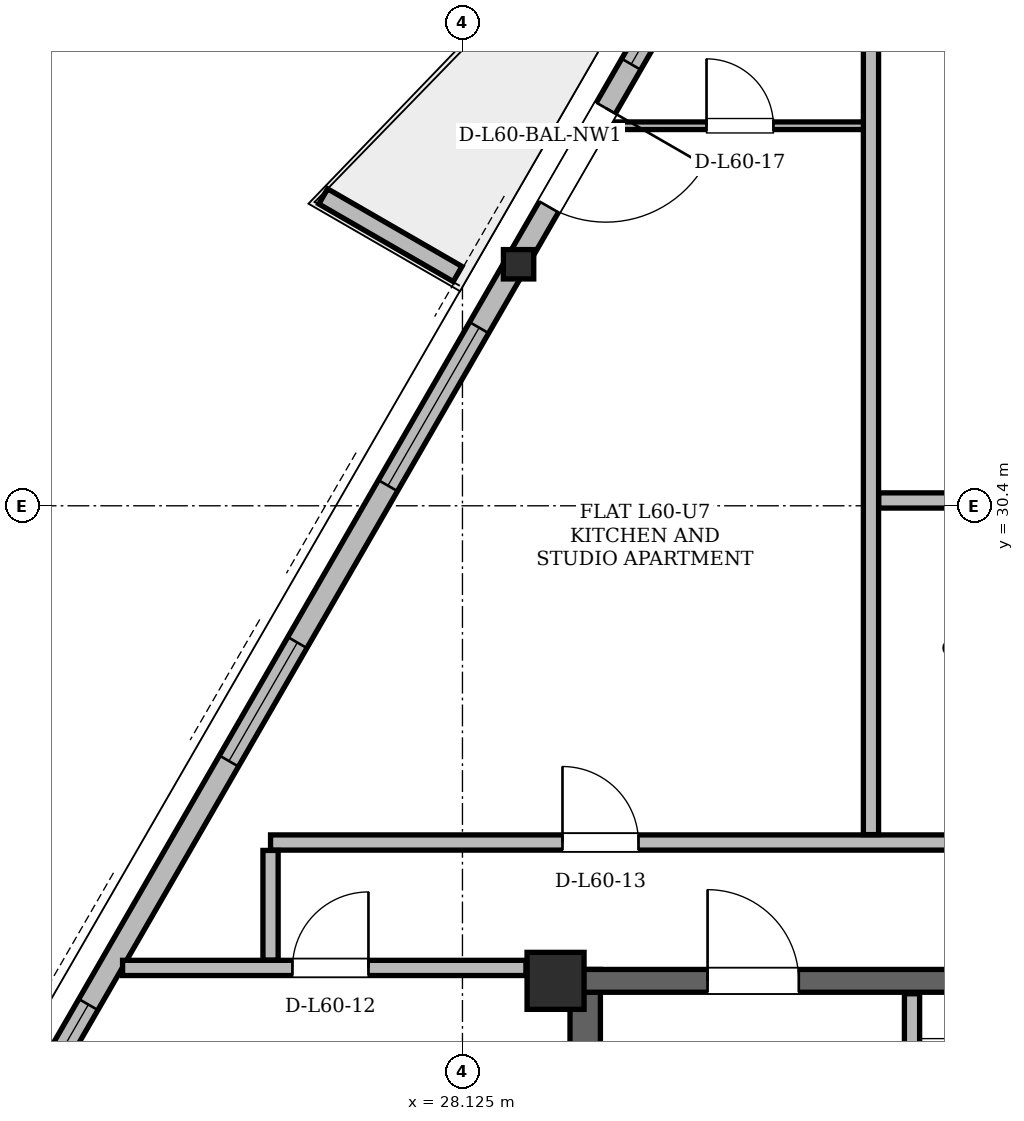
"""IFC4 building model, lengths in metres.
Left out: names, types, materials, properties, quantities, classifications, styles, units other than length and angle.
Written with IfcOpenShell. Run it as: python <this file> out.ifc"""

import sys

from ifc_helpers import new_model, si_unit, direction, frame, frame_2d, origin, origin_2d, place, context, subcontext, project, spatial, polyline, rectangle, hollow_rectangle, i_section, outline, extrude, element, fill, save


model = new_model("IFC4")
c1 = context("Model", 3, precision=1e-05, world=origin(), true_north=direction((0.0, 1.0)))
c2 = subcontext(c1, "Body", "Model", "MODEL_VIEW")
j1 = project(units=[si_unit("LENGTHUNIT", "METRE"), si_unit("PLANEANGLEUNIT", "RADIAN")], contexts=[c1])
p1 = place(None, origin())
s1 = spatial("IfcSite", under=j1, at=p1, CompositionType="ELEMENT")
p2 = place(p1, origin())
s2 = spatial("IfcBuilding", under=s1, at=p2, CompositionType="ELEMENT")
p3 = place(p2, frame((0.0, 0.0, 227.1)))
s3 = spatial("IfcBuildingStorey", under=s2, at=p3, CompositionType="ELEMENT", Elevation=227.1)
p4 = place(p3, frame((29.35, 24.15, 0.0), z_axis=(0.0, 0.0, 1.0), x_axis=(1.0, 0.0, 0.0)))
e1 = element("IfcColumn", 1, at=p4, inside=s3, PredefinedType="COLUMN", context=c2, shape_type="SweptSolid", body=[
    extrude(hollow_rectangle(XDim=0.75, YDim=0.75, WallThickness=0.06, at=origin_2d()), origin(), (0.0, 0.0, 1.0), 3.6),
])
p5 = place(p3, frame((28.833, 33.589, 0.004), z_axis=(0.017129504481, -0.006389577068, 0.999832862723), x_axis=(0.349493096334, 0.936938939107, 0.0)))
e2 = element("IfcColumn", 2, at=p5, inside=s3, PredefinedType="COLUMN", context=c2, shape_type="SweptSolid", body=[
    extrude(i_section(OverallWidth=0.399, OverallDepth=0.386, WebThickness=0.021, FlangeThickness=0.033, at=origin_2d()), origin(), (0.0, 0.0, 1.0), 3.592),
])
p6 = place(p3, frame((29.74, 11.0, 0.0), z_axis=(0.0, 0.0, 1.0), x_axis=(0.0, 1.0, 0.0)))
e3 = element("IfcWall", 3, at=p6, inside=s3, PredefinedType="SHEAR", context=c2, shape_type="SweptSolid", body=[
    extrude(rectangle(XDim=13.3, YDim=0.4, at=frame_2d((6.65, 0.0))), origin(), (0.0, 0.0, 1.0), 3.38),
])
p7 = place(p3, frame((29.65, 24.15, 0.0), z_axis=(0.0, 0.0, 1.0), x_axis=(1.0, 0.0, 0.0)))
e4 = element("IfcWall", 4, at=p7, inside=s3, PredefinedType="SHEAR", context=c2, shape_type="SweptSolid", body=[
    extrude(rectangle(XDim=15.7, YDim=0.3, at=frame_2d((7.85, 0.0))), origin(), (0.0, 0.0, 1.0), 3.38),
])
p8 = place(p7, frame((1.7, 0.0, 0.0)))
e5 = element("IfcOpeningElement", 5, at=p8, cuts=e4, PredefinedType="OPENING", context=c2, shape_type="SweptSolid", body=[
    extrude(rectangle(XDim=1.2, YDim=2.2, at=frame_2d((0.6, 1.1))), frame((0.0, 0.15, 0.0), z_axis=(0.0, -1.0, 0.0), x_axis=(1.0, 0.0, 0.0)), (0.0, 0.0, 1.0), 0.3),
])
p9 = place(p7, frame((12.8, 0.0, 0.0)))
e6 = element("IfcOpeningElement", 6, at=p9, cuts=e4, PredefinedType="OPENING", context=c2, shape_type="SweptSolid", body=[
    extrude(rectangle(XDim=1.2, YDim=2.2, at=frame_2d((0.6, 1.1))), frame((0.0, 0.15, 0.0), z_axis=(0.0, -1.0, 0.0), x_axis=(1.0, 0.0, 0.0)), (0.0, 0.0, 1.0), 0.3),
])
p10 = place(p7, frame((6.55, 0.0, 0.0)))
e7 = element("IfcOpeningElement", 7, at=p10, cuts=e4, PredefinedType="OPENING", context=c2, shape_type="SweptSolid", body=[
    extrude(rectangle(XDim=0.9, YDim=2.05, at=frame_2d((0.45, 1.025))), frame((0.0, 0.15, 0.0), z_axis=(0.0, -1.0, 0.0), x_axis=(1.0, 0.0, 0.0)), (0.0, 0.0, 1.0), 0.3),
])
p11 = place(p7, frame((8.45, 0.0, 0.0)))
e8 = element("IfcOpeningElement", 8, at=p11, cuts=e4, PredefinedType="OPENING", context=c2, shape_type="SweptSolid", body=[
    extrude(rectangle(XDim=0.9, YDim=2.05, at=frame_2d((0.45, 1.025))), frame((0.0, 0.15, 0.0), z_axis=(0.0, -1.0, 0.0), x_axis=(1.0, 0.0, 0.0)), (0.0, 0.0, 1.0), 0.3),
])
p12 = place(p3, frame((34.344, 43.135, 0.0), z_axis=(0.0, 0.0, 1.0), x_axis=(-0.499998927115, -0.866026023214, 0.0)))
e9 = element("IfcWall", 9, at=p12, inside=s3, PredefinedType="SOLIDWALL", context=c2, shape_type="SweptSolid", body=[
    extrude(rectangle(XDim=36.742, YDim=0.29, at=frame_2d((18.371, 0.0))), origin(), (0.0, 0.0, 1.0), 2.677),
])
p13 = place(p12, frame((8.664, 0.0, 0.0)))
e10 = element("IfcOpeningElement", 10, at=p13, cuts=e9, PredefinedType="OPENING", context=c2, shape_type="SweptSolid", body=[
    extrude(rectangle(XDim=1.5, YDim=2.2, at=frame_2d((0.75, 1.1))), frame((0.0, 0.145, 0.0), z_axis=(0.0, -1.0, 0.0), x_axis=(1.0, 0.0, 0.0)), (0.0, 0.0, 1.0), 0.29),
])
p14 = place(p12, frame((28.452, 0.0, 0.0)))
e11 = element("IfcOpeningElement", 11, at=p14, cuts=e9, PredefinedType="OPENING", context=c2, shape_type="SweptSolid", body=[
    extrude(rectangle(XDim=1.5, YDim=2.2, at=frame_2d((0.75, 1.1))), frame((0.0, 0.145, 0.0), z_axis=(0.0, -1.0, 0.0), x_axis=(1.0, 0.0, 0.0)), (0.0, 0.0, 1.0), 0.29),
])
p15 = place(p12, frame((22.282, 0.0, 0.85)))
e12 = element("IfcOpeningElement", 12, at=p15, cuts=e9, PredefinedType="OPENING", context=c2, shape_type="SweptSolid", body=[
    extrude(rectangle(XDim=2.4, YDim=1.717, at=frame_2d((1.2, 0.858))), frame((0.0, 0.145, 0.0), z_axis=(0.0, -1.0, 0.0), x_axis=(1.0, 0.0, 0.0)), (0.0, 0.0, 1.0), 0.29),
])
p16 = place(p12, frame((33.369, 0.0, 0.85)))
e13 = element("IfcOpeningElement", 13, at=p16, cuts=e9, PredefinedType="OPENING", context=c2, shape_type="SweptSolid", body=[
    extrude(rectangle(XDim=2.2, YDim=1.717, at=frame_2d((1.1, 0.858))), frame((0.0, 0.145, 0.0), z_axis=(0.0, -1.0, 0.0), x_axis=(1.0, 0.0, 0.0)), (0.0, 0.0, 1.0), 0.29),
])
p17 = place(p12, frame((11.999, 0.0, 0.85)))
e14 = element("IfcOpeningElement", 14, at=p17, cuts=e9, PredefinedType="OPENING", context=c2, shape_type="SweptSolid", body=[
    extrude(rectangle(XDim=2.4, YDim=1.717, at=frame_2d((1.2, 0.858))), frame((0.0, 0.145, 0.0), z_axis=(0.0, -1.0, 0.0), x_axis=(1.0, 0.0, 0.0)), (0.0, 0.0, 1.0), 0.29),
])
p18 = place(p12, frame((16.783, 0.0, 0.85)))
e15 = element("IfcOpeningElement", 15, at=p18, cuts=e9, PredefinedType="OPENING", context=c2, shape_type="SweptSolid", body=[
    extrude(rectangle(XDim=1.8, YDim=1.717, at=frame_2d((0.9, 0.858))), frame((0.0, 0.145, 0.0), z_axis=(0.0, -1.0, 0.0), x_axis=(1.0, 0.0, 0.0)), (0.0, 0.0, 1.0), 0.29),
])
p19 = place(p12, frame((3.365, 0.0, 0.85)))
e16 = element("IfcOpeningElement", 16, at=p19, cuts=e9, PredefinedType="OPENING", context=c2, shape_type="SweptSolid", body=[
    extrude(rectangle(XDim=1.2, YDim=1.48, at=frame_2d((0.6, 0.74))), frame((0.0, 0.145, 0.0), z_axis=(0.0, -1.0, 0.0), x_axis=(1.0, 0.0, 0.0)), (0.0, 0.0, 1.0), 0.29),
])
p20 = place(p12, frame((6.797, 0.0, 0.85)))
e17 = element("IfcOpeningElement", 17, at=p20, cuts=e9, PredefinedType="OPENING", context=c2, shape_type="SweptSolid", body=[
    extrude(rectangle(XDim=1.2, YDim=1.48, at=frame_2d((0.6, 0.74))), frame((0.0, 0.145, 0.0), z_axis=(0.0, -1.0, 0.0), x_axis=(1.0, 0.0, 0.0)), (0.0, 0.0, 1.0), 0.29),
])
p21 = place(p3, frame((28.061, 33.449, 0.0), z_axis=(0.0, 0.0, 1.0), x_axis=(-0.866012356593, 0.500022597718, 0.0)))
e18 = element("IfcWall", 18, at=p21, inside=s3, PredefinedType="PARAPET", context=c2, shape_type="SweptSolid", body=[
    extrude(outline(polyline([(0.0, 0.0), (2.042, 0.0), (2.042, 1.1), (0.0, 1.32), (0.0, 0.0)])), frame((0.0, 0.115, 0.0), z_axis=(0.0, -1.0, 0.0), x_axis=(1.0, 0.0, 0.0)), (0.0, 0.0, 1.0), 0.23),
])
p22 = place(p3, frame((34.04, 19.48, 0.0), z_axis=(0.0, 0.0, 1.0), x_axis=(0.0, 1.0, 0.0)))
e19 = element("IfcWall", 19, at=p22, inside=s3, PredefinedType="PARTITIONING", context=c2, shape_type="SweptSolid", body=[
    extrude(rectangle(XDim=4.5, YDim=0.2, at=frame_2d((2.25, 0.0))), origin(), (0.0, 0.0, 1.0), 3.38),
])
p23 = place(p22, frame((2.12, 0.0, 0.0)))
e20 = element("IfcOpeningElement", 20, at=p23, cuts=e19, PredefinedType="OPENING", context=c2, shape_type="SweptSolid", body=[
    extrude(rectangle(XDim=1.1, YDim=2.2, at=frame_2d((0.55, 1.1))), frame((0.0, 0.1, 0.0), z_axis=(0.0, -1.0, 0.0), x_axis=(1.0, 0.0, 0.0)), (0.0, 0.0, 1.0), 0.2),
])
p24 = place(p3, frame((23.653, 24.32, 0.0), z_axis=(0.0, 0.0, 1.0), x_axis=(1.0, 0.0, 0.0)))
e21 = element("IfcWall", 21, at=p24, inside=s3, PredefinedType="PARTITIONING", context=c2, shape_type="SweptSolid", body=[
    extrude(rectangle(XDim=5.307, YDim=0.2, at=frame_2d((2.653, 0.0))), origin(), (0.0, 0.0, 1.0), 3.38),
])
p25 = place(p24, frame((2.235, 0.0, 0.0)))
e22 = element("IfcOpeningElement", 22, at=p25, cuts=e21, PredefinedType="OPENING", context=c2, shape_type="SweptSolid", body=[
    extrude(rectangle(XDim=1.0, YDim=2.18, at=frame_2d((0.5, 1.09))), frame((0.0, 0.1, 0.0), z_axis=(0.0, -1.0, 0.0), x_axis=(1.0, 0.0, 0.0)), (0.0, 0.0, 1.0), 0.2),
])
p26 = place(p3, frame((25.6, 25.97, 0.0), z_axis=(0.0, 0.0, 1.0), x_axis=(1.0, 0.0, 0.0)))
e23 = element("IfcWall", 23, at=p26, inside=s3, PredefinedType="PARTITIONING", context=c2, shape_type="SweptSolid", body=[
    extrude(rectangle(XDim=21.85, YDim=0.2, at=frame_2d((10.925, 0.0))), origin(), (0.0, 0.0, 1.0), 2.913),
])
p27 = place(p26, frame((3.841, 0.0, 0.0)))
e24 = element("IfcOpeningElement", 24, at=p27, cuts=e23, PredefinedType="OPENING", context=c2, shape_type="SweptSolid", body=[
    extrude(rectangle(XDim=1.0, YDim=2.18, at=frame_2d((0.5, 1.09))), frame((0.0, 0.1, 0.0), z_axis=(0.0, -1.0, 0.0), x_axis=(1.0, 0.0, 0.0)), (0.0, 0.0, 1.0), 0.2),
])
p28 = place(p26, frame((9.75, 0.0, 0.0)))
e25 = element("IfcOpeningElement", 25, at=p28, cuts=e23, PredefinedType="OPENING", context=c2, shape_type="SweptSolid", body=[
    extrude(rectangle(XDim=1.3, YDim=2.2, at=frame_2d((0.65, 1.1))), frame((0.0, 0.1, 0.0), z_axis=(0.0, -1.0, 0.0), x_axis=(1.0, 0.0, 0.0)), (0.0, 0.0, 1.0), 0.2),
])
p29 = place(p26, frame((13.777, 0.0, 0.0)))
e26 = element("IfcOpeningElement", 26, at=p29, cuts=e23, PredefinedType="OPENING", context=c2, shape_type="SweptSolid", body=[
    extrude(rectangle(XDim=1.0, YDim=2.18, at=frame_2d((0.5, 1.09))), frame((0.0, 0.1, 0.0), z_axis=(0.0, -1.0, 0.0), x_axis=(1.0, 0.0, 0.0)), (0.0, 0.0, 1.0), 0.2),
])
p30 = place(p26, frame((19.034, 0.0, 0.0)))
e27 = element("IfcOpeningElement", 27, at=p30, cuts=e23, PredefinedType="OPENING", context=c2, shape_type="SweptSolid", body=[
    extrude(rectangle(XDim=1.0, YDim=2.18, at=frame_2d((0.5, 1.09))), frame((0.0, 0.1, 0.0), z_axis=(0.0, -1.0, 0.0), x_axis=(1.0, 0.0, 0.0)), (0.0, 0.0, 1.0), 0.2),
])
p31 = place(p3, frame((33.6, 30.47, 0.0), z_axis=(0.0, 0.0, 1.0), x_axis=(1.0, 0.0, 0.0)))
e28 = element("IfcWall", 28, at=p31, inside=s3, PredefinedType="PARTITIONING", context=c2, shape_type="SweptSolid", body=[
    extrude(rectangle(XDim=4.8, YDim=0.2, at=frame_2d((2.4, 0.0))), origin(), (0.0, 0.0, 1.0), 3.38),
])
p32 = place(p3, frame((30.05, 35.4, 0.0), z_axis=(0.0, 0.0, 1.0), x_axis=(1.0, 0.0, 0.0)))
e29 = element("IfcWall", 29, at=p32, inside=s3, PredefinedType="PARTITIONING", context=c2, shape_type="SweptSolid", body=[
    extrude(rectangle(XDim=3.532, YDim=0.1, at=frame_2d((1.766, 0.0))), origin(), (0.0, 0.0, 1.0), 3.38),
])
p33 = place(p32, frame((1.286, 0.0, 0.0)))
e30 = element("IfcOpeningElement", 30, at=p33, cuts=e29, PredefinedType="OPENING", context=c2, shape_type="SweptSolid", body=[
    extrude(rectangle(XDim=0.88, YDim=2.08, at=frame_2d((0.44, 1.04))), frame((0.0, 0.05, 0.0), z_axis=(0.0, -1.0, 0.0), x_axis=(1.0, 0.0, 0.0)), (0.0, 0.0, 1.0), 0.1),
])
p34 = place(p3, frame((25.6, 24.424, 0.0), z_axis=(0.0, 0.0, 1.0), x_axis=(0.0, 1.0, 0.0)))
e31 = element("IfcWall", 31, at=p34, inside=s3, PredefinedType="PARTITIONING", context=c2, shape_type="SweptSolid", body=[
    extrude(rectangle(XDim=1.442, YDim=0.2, at=frame_2d((0.721, 0.0))), origin(), (0.0, 0.0, 1.0), 3.38),
])
p35 = place(p3, frame((33.5, 26.074, 0.0), z_axis=(0.0, 0.0, 1.0), x_axis=(0.0, 1.0, 0.0)))
e32 = element("IfcWall", 32, at=p35, inside=s3, PredefinedType="PARTITIONING", context=c2, shape_type="SweptSolid", body=[
    extrude(rectangle(XDim=15.301, YDim=0.2, at=frame_2d((7.651, 0.0))), origin(), (0.0, 0.0, 1.0), 2.913),
])
p36 = place(p13, origin())
e33 = element("IfcDoor", 33, at=p36, inside=s3, OperationType="SINGLE_SWING_LEFT", PredefinedType="DOOR", context=c2, shape_type="SweptSolid", body=[
    extrude(rectangle(XDim=1.5, YDim=2.2, at=frame_2d((0.75, 1.1))), frame((0.0, 0.025, 0.0), z_axis=(0.0, -1.0, 0.0), x_axis=(1.0, 0.0, 0.0)), (0.0, 0.0, 1.0), 0.05),
])
fill(e10, e33)
p37 = place(p15, origin())
e34 = element("IfcWindow", 34, at=p37, inside=s3, PartitioningType="SINGLE_PANEL", PredefinedType="WINDOW", context=c2, shape_type="SweptSolid", body=[
    extrude(rectangle(XDim=2.4, YDim=1.717, at=frame_2d((1.2, 0.858))), frame((0.0, 0.03, 0.0), z_axis=(0.0, -1.0, 0.0), x_axis=(1.0, 0.0, 0.0)), (0.0, 0.0, 1.0), 0.06),
])
fill(e12, e34)
p38 = place(p17, origin())
e35 = element("IfcWindow", 35, at=p38, inside=s3, PartitioningType="SINGLE_PANEL", PredefinedType="WINDOW", context=c2, shape_type="SweptSolid", body=[
    extrude(rectangle(XDim=2.4, YDim=1.717, at=frame_2d((1.2, 0.858))), frame((0.0, 0.03, 0.0), z_axis=(0.0, -1.0, 0.0), x_axis=(1.0, 0.0, 0.0)), (0.0, 0.0, 1.0), 0.06),
])
fill(e14, e35)
p39 = place(p18, origin())
e36 = element("IfcWindow", 36, at=p39, inside=s3, PartitioningType="SINGLE_PANEL", PredefinedType="WINDOW", context=c2, shape_type="SweptSolid", body=[
    extrude(rectangle(XDim=1.8, YDim=1.717, at=frame_2d((0.9, 0.858))), frame((0.0, 0.03, 0.0), z_axis=(0.0, -1.0, 0.0), x_axis=(1.0, 0.0, 0.0)), (0.0, 0.0, 1.0), 0.06),
])
fill(e15, e36)
p40 = place(p20, origin())
e37 = element("IfcWindow", 37, at=p40, inside=s3, PartitioningType="SINGLE_PANEL", PredefinedType="WINDOW", context=c2, shape_type="SweptSolid", body=[
    extrude(rectangle(XDim=1.2, YDim=1.48, at=frame_2d((0.6, 0.74))), frame((0.0, 0.03, 0.0), z_axis=(0.0, -1.0, 0.0), x_axis=(1.0, 0.0, 0.0)), (0.0, 0.0, 1.0), 0.06),
])
fill(e17, e37)
p41 = place(p8, origin())
e38 = element("IfcDoor", 38, at=p41, inside=s3, OperationType="SINGLE_SWING_LEFT", PredefinedType="DOOR", context=c2, shape_type="SweptSolid", body=[
    extrude(rectangle(XDim=1.2, YDim=2.2, at=frame_2d((0.6, 1.1))), frame((0.0, 0.025, 0.0), z_axis=(0.0, -1.0, 0.0), x_axis=(1.0, 0.0, 0.0)), (0.0, 0.0, 1.0), 0.05),
])
fill(e5, e38)
p42 = place(p25, origin())
e39 = element("IfcDoor", 39, at=p42, inside=s3, OperationType="SINGLE_SWING_RIGHT", PredefinedType="DOOR", context=c2, shape_type="SweptSolid", body=[
    extrude(rectangle(XDim=1.0, YDim=2.18, at=frame_2d((0.5, 1.09))), frame((0.0, 0.025, 0.0), z_axis=(0.0, -1.0, 0.0), x_axis=(1.0, 0.0, 0.0)), (0.0, 0.0, 1.0), 0.05),
])
fill(e22, e39)
p43 = place(p27, origin())
e40 = element("IfcDoor", 40, at=p43, inside=s3, OperationType="SINGLE_SWING_LEFT", PredefinedType="DOOR", context=c2, shape_type="SweptSolid", body=[
    extrude(rectangle(XDim=1.0, YDim=2.18, at=frame_2d((0.5, 1.09))), frame((0.0, 0.025, 0.0), z_axis=(0.0, -1.0, 0.0), x_axis=(1.0, 0.0, 0.0)), (0.0, 0.0, 1.0), 0.05),
])
fill(e24, e40)
p44 = place(p33, origin())
e41 = element("IfcDoor", 41, at=p44, inside=s3, OperationType="SINGLE_SWING_LEFT", PredefinedType="DOOR", context=c2, shape_type="SweptSolid", body=[
    extrude(rectangle(XDim=0.88, YDim=2.08, at=frame_2d((0.44, 1.04))), frame((0.0, 0.025, 0.0), z_axis=(0.0, -1.0, 0.0), x_axis=(1.0, 0.0, 0.0)), (0.0, 0.0, 1.0), 0.05),
])
fill(e30, e41)
save(model, sys.argv[1])
